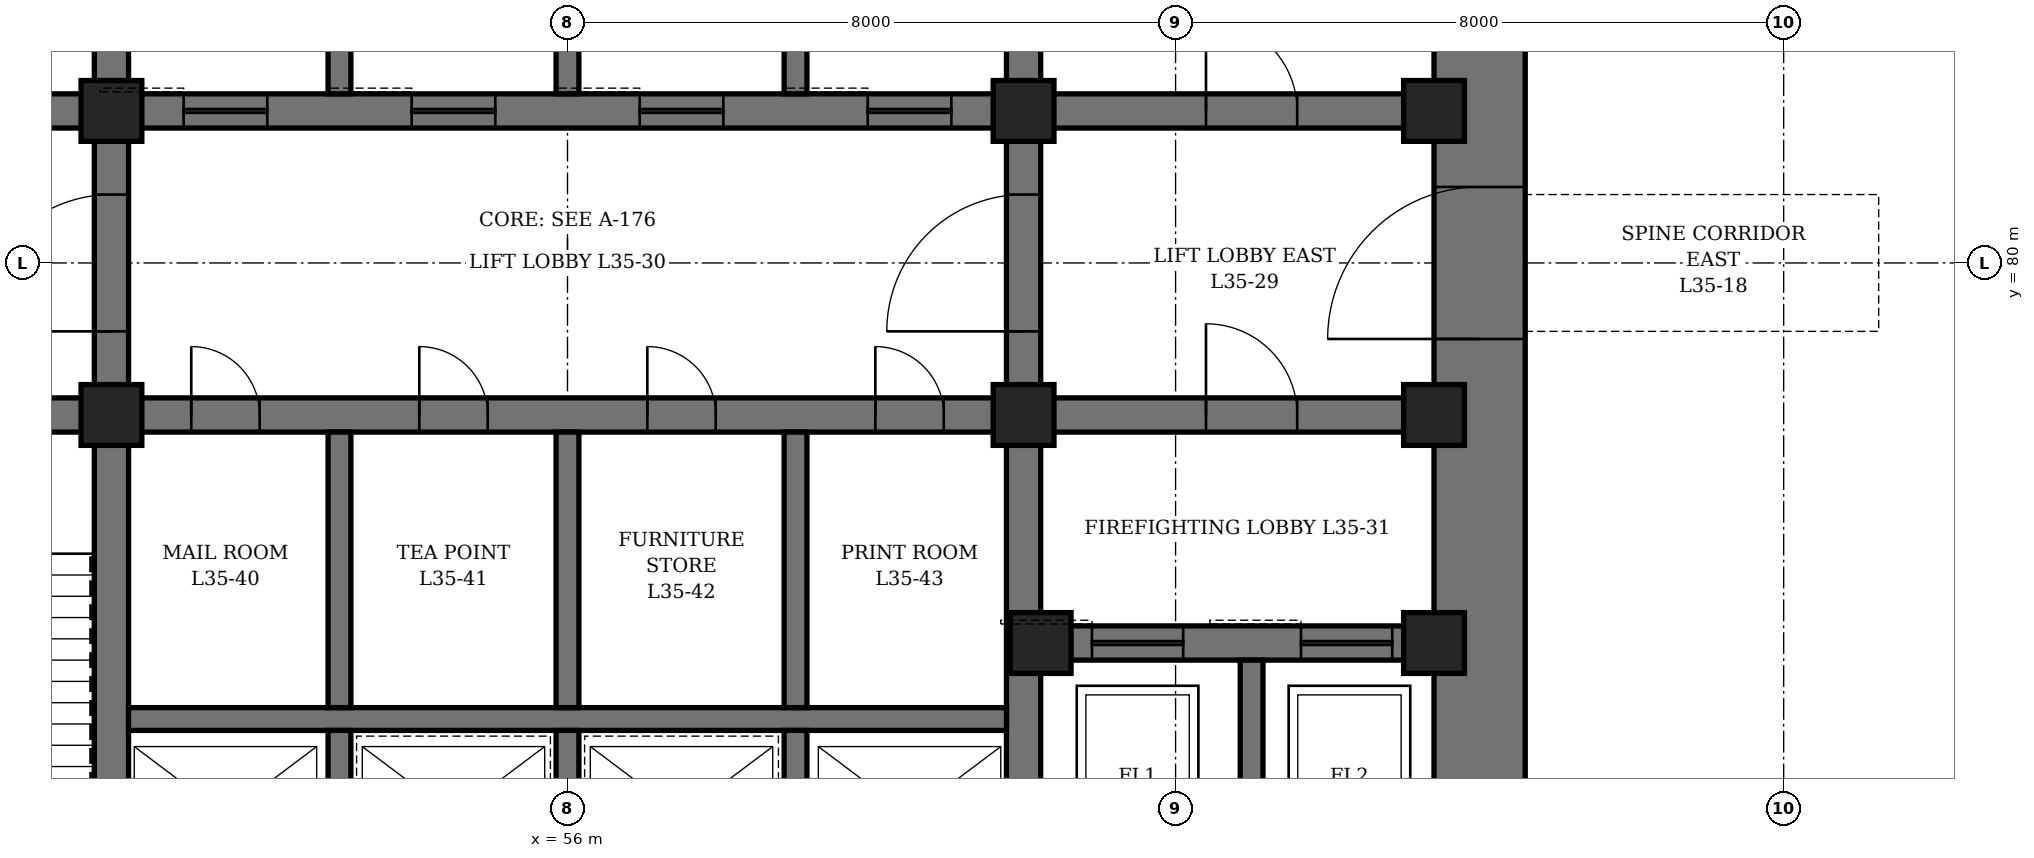
"""IFC4 building model, lengths in metres.
Left out: names, types, materials, properties, quantities, classifications, styles, units other than length and angle.
Written with IfcOpenShell. Run it as: python <this file> out.ifc"""

import sys

from ifc_helpers import new_model, si_unit, direction, frame, frame_2d, origin, origin_2d, place, context, subcontext, project, spatial, rectangle, hollow_rectangle, extrude, element, fill, save


model = new_model("IFC4")
c1 = context("Model", 3, precision=1e-05, world=origin(), true_north=direction((0.0, 1.0)))
c2 = subcontext(c1, "Body", "Model", "MODEL_VIEW")
j1 = project(units=[si_unit("LENGTHUNIT", "METRE"), si_unit("PLANEANGLEUNIT", "RADIAN")], contexts=[c1])
p1 = place(None, origin())
s1 = spatial("IfcSite", under=j1, at=p1, CompositionType="ELEMENT")
p2 = place(p1, origin())
s2 = spatial("IfcBuilding", under=s1, at=p2, CompositionType="ELEMENT")
p3 = place(p2, frame((0.0, 0.0, 158.5)))
s3 = spatial("IfcBuildingStorey", under=s2, at=p3, CompositionType="ELEMENT", Elevation=158.5)
p4 = place(p3, frame((68.0, 70.4, 0.0), z_axis=(0.0, 0.0, 1.0), x_axis=(0.0, 1.0, 0.0)))
e1 = element("IfcWall", 1, at=p4, inside=s3, PredefinedType="SHEAR", context=c2, shape_type="SweptSolid", body=[
    extrude(rectangle(XDim=19.2, YDim=1.2, at=frame_2d((9.6, 0.0))), origin(), (0.0, 0.0, 1.0), 4.2),
])
p5 = place(p4, frame((8.6, 0.0, 0.0)))
e2 = element("IfcOpeningElement", 2, at=p5, cuts=e1, PredefinedType="OPENING", context=c2, shape_type="SweptSolid", body=[
    extrude(rectangle(XDim=2.0, YDim=2.4, at=frame_2d((1.0, 1.2))), frame((0.0, 0.61, 0.0), z_axis=(0.0, -1.0, 0.0), x_axis=(1.0, 0.0, 0.0)), (0.0, 0.0, 1.0), 1.22),
])
p6 = place(p3, frame((50.0, 71.6, 0.0), z_axis=(0.0, 0.0, 1.0), x_axis=(0.0, 1.0, 0.0)))
e3 = element("IfcWall", 3, at=p6, inside=s3, PredefinedType="SHEAR", context=c2, shape_type="SweptSolid", body=[
    extrude(rectangle(XDim=16.8, YDim=0.45, at=frame_2d((8.4, 0.0))), origin(), (0.0, 0.0, 1.0), 4.2),
])
p7 = place(p6, frame((7.5, 0.0, 0.0)))
e4 = element("IfcOpeningElement", 4, at=p7, cuts=e3, PredefinedType="OPENING", context=c2, shape_type="SweptSolid", body=[
    extrude(rectangle(XDim=1.8, YDim=2.4, at=frame_2d((0.9, 1.2))), frame((0.0, 0.235, 0.0), z_axis=(0.0, -1.0, 0.0), x_axis=(1.0, 0.0, 0.0)), (0.0, 0.0, 1.0), 0.47),
])
p8 = place(p3, frame((62.0, 71.6, 0.0), z_axis=(0.0, 0.0, 1.0), x_axis=(0.0, 1.0, 0.0)))
e5 = element("IfcWall", 5, at=p8, inside=s3, PredefinedType="SHEAR", context=c2, shape_type="SweptSolid", body=[
    extrude(rectangle(XDim=16.8, YDim=0.45, at=frame_2d((8.4, 0.0))), origin(), (0.0, 0.0, 1.0), 4.2),
])
p9 = place(p8, frame((7.5, 0.0, 0.0)))
e6 = element("IfcOpeningElement", 6, at=p9, cuts=e5, PredefinedType="OPENING", context=c2, shape_type="SweptSolid", body=[
    extrude(rectangle(XDim=1.8, YDim=2.4, at=frame_2d((0.9, 1.2))), frame((0.0, 0.235, 0.0), z_axis=(0.0, -1.0, 0.0), x_axis=(1.0, 0.0, 0.0)), (0.0, 0.0, 1.0), 0.47),
])
p10 = place(p3, frame((44.6, 78.0, 0.0), z_axis=(0.0, 0.0, 1.0), x_axis=(1.0, 0.0, 0.0)))
e7 = element("IfcWall", 7, at=p10, inside=s3, PredefinedType="SHEAR", context=c2, shape_type="SweptSolid", body=[
    extrude(rectangle(XDim=5.175, YDim=0.45, at=frame_2d((2.587, 0.0))), origin(), (0.0, 0.0, 1.0), 4.2),
])
p11 = place(p10, frame((1.8, 0.0, 0.0)))
e8 = element("IfcOpeningElement", 8, at=p11, cuts=e7, PredefinedType="OPENING", context=c2, shape_type="SweptSolid", body=[
    extrude(rectangle(XDim=1.2, YDim=2.1, at=frame_2d((0.6, 1.05))), frame((0.0, 0.235, 0.0), z_axis=(0.0, -1.0, 0.0), x_axis=(1.0, 0.0, 0.0)), (0.0, 0.0, 1.0), 0.47),
])
p12 = place(p3, frame((44.6, 82.0, 0.0), z_axis=(0.0, 0.0, 1.0), x_axis=(1.0, 0.0, 0.0)))
e9 = element("IfcWall", 9, at=p12, inside=s3, PredefinedType="SHEAR", context=c2, shape_type="SweptSolid", body=[
    extrude(rectangle(XDim=5.175, YDim=0.45, at=frame_2d((2.587, 0.0))), origin(), (0.0, 0.0, 1.0), 4.2),
])
p13 = place(p12, frame((0.7, 0.0, 0.0)))
e10 = element("IfcOpeningElement", 10, at=p13, cuts=e9, PredefinedType="OPENING", context=c2, shape_type="SweptSolid", body=[
    extrude(rectangle(XDim=0.9, YDim=2.1, at=frame_2d((0.45, 1.05))), frame((0.0, 0.235, 0.0), z_axis=(0.0, -1.0, 0.0), x_axis=(1.0, 0.0, 0.0)), (0.0, 0.0, 1.0), 0.47),
])
p14 = place(p3, frame((62.225, 75.0, 0.0), z_axis=(0.0, 0.0, 1.0), x_axis=(1.0, 0.0, 0.0)))
e11 = element("IfcWall", 11, at=p14, inside=s3, PredefinedType="SHEAR", context=c2, shape_type="SweptSolid", body=[
    extrude(rectangle(XDim=5.175, YDim=0.45, at=frame_2d((2.587, 0.0))), origin(), (0.0, 0.0, 1.0), 4.2),
])
p15 = place(p14, frame((0.675, 0.0, 0.0)))
e12 = element("IfcOpeningElement", 12, at=p15, cuts=e11, PredefinedType="OPENING", context=c2, shape_type="SweptSolid", body=[
    extrude(rectangle(XDim=1.2, YDim=2.2, at=frame_2d((0.6, 1.1))), frame((0.0, 0.235, 0.0), z_axis=(0.0, -1.0, 0.0), x_axis=(1.0, 0.0, 0.0)), (0.0, 0.0, 1.0), 0.47),
])
p16 = place(p14, frame((3.425, 0.0, 0.0)))
e13 = element("IfcOpeningElement", 13, at=p16, cuts=e11, PredefinedType="OPENING", context=c2, shape_type="SweptSolid", body=[
    extrude(rectangle(XDim=1.2, YDim=2.2, at=frame_2d((0.6, 1.1))), frame((0.0, 0.235, 0.0), z_axis=(0.0, -1.0, 0.0), x_axis=(1.0, 0.0, 0.0)), (0.0, 0.0, 1.0), 0.47),
])
p17 = place(p3, frame((62.225, 78.0, 0.0), z_axis=(0.0, 0.0, 1.0), x_axis=(1.0, 0.0, 0.0)))
e14 = element("IfcWall", 14, at=p17, inside=s3, PredefinedType="SHEAR", context=c2, shape_type="SweptSolid", body=[
    extrude(rectangle(XDim=5.175, YDim=0.45, at=frame_2d((2.587, 0.0))), origin(), (0.0, 0.0, 1.0), 4.2),
])
p18 = place(p17, frame((2.175, 0.0, 0.0)))
e15 = element("IfcOpeningElement", 15, at=p18, cuts=e14, PredefinedType="OPENING", context=c2, shape_type="SweptSolid", body=[
    extrude(rectangle(XDim=1.2, YDim=2.1, at=frame_2d((0.6, 1.05))), frame((0.0, 0.235, 0.0), z_axis=(0.0, -1.0, 0.0), x_axis=(1.0, 0.0, 0.0)), (0.0, 0.0, 1.0), 0.47),
])
p19 = place(p3, frame((62.225, 82.0, 0.0), z_axis=(0.0, 0.0, 1.0), x_axis=(1.0, 0.0, 0.0)))
e16 = element("IfcWall", 16, at=p19, inside=s3, PredefinedType="SHEAR", context=c2, shape_type="SweptSolid", body=[
    extrude(rectangle(XDim=5.175, YDim=0.45, at=frame_2d((2.587, 0.0))), origin(), (0.0, 0.0, 1.0), 4.2),
])
p20 = place(p19, frame((2.175, 0.0, 0.0)))
e17 = element("IfcOpeningElement", 17, at=p20, cuts=e16, PredefinedType="OPENING", context=c2, shape_type="SweptSolid", body=[
    extrude(rectangle(XDim=1.2, YDim=2.1, at=frame_2d((0.6, 1.05))), frame((0.0, 0.235, 0.0), z_axis=(0.0, -1.0, 0.0), x_axis=(1.0, 0.0, 0.0)), (0.0, 0.0, 1.0), 0.47),
])
p21 = place(p3, frame((50.225, 78.0, 0.0), z_axis=(0.0, 0.0, 1.0), x_axis=(1.0, 0.0, 0.0)))
e18 = element("IfcWall", 18, at=p21, inside=s3, PredefinedType="SHEAR", context=c2, shape_type="SweptSolid", body=[
    extrude(rectangle(XDim=11.55, YDim=0.45, at=frame_2d((5.775, 0.0))), origin(), (0.0, 0.0, 1.0), 4.2),
])
p22 = place(p21, frame((0.825, 0.0, 0.0)))
e19 = element("IfcOpeningElement", 19, at=p22, cuts=e18, PredefinedType="OPENING", context=c2, shape_type="SweptSolid", body=[
    extrude(rectangle(XDim=0.9, YDim=2.1, at=frame_2d((0.45, 1.05))), frame((0.0, 0.235, 0.0), z_axis=(0.0, -1.0, 0.0), x_axis=(1.0, 0.0, 0.0)), (0.0, 0.0, 1.0), 0.47),
])
p23 = place(p21, frame((3.825, 0.0, 0.0)))
e20 = element("IfcOpeningElement", 20, at=p23, cuts=e18, PredefinedType="OPENING", context=c2, shape_type="SweptSolid", body=[
    extrude(rectangle(XDim=0.9, YDim=2.1, at=frame_2d((0.45, 1.05))), frame((0.0, 0.235, 0.0), z_axis=(0.0, -1.0, 0.0), x_axis=(1.0, 0.0, 0.0)), (0.0, 0.0, 1.0), 0.47),
])
p24 = place(p21, frame((6.825, 0.0, 0.0)))
e21 = element("IfcOpeningElement", 21, at=p24, cuts=e18, PredefinedType="OPENING", context=c2, shape_type="SweptSolid", body=[
    extrude(rectangle(XDim=0.9, YDim=2.1, at=frame_2d((0.45, 1.05))), frame((0.0, 0.235, 0.0), z_axis=(0.0, -1.0, 0.0), x_axis=(1.0, 0.0, 0.0)), (0.0, 0.0, 1.0), 0.47),
])
p25 = place(p21, frame((9.825, 0.0, 0.0)))
e22 = element("IfcOpeningElement", 22, at=p25, cuts=e18, PredefinedType="OPENING", context=c2, shape_type="SweptSolid", body=[
    extrude(rectangle(XDim=0.9, YDim=2.1, at=frame_2d((0.45, 1.05))), frame((0.0, 0.235, 0.0), z_axis=(0.0, -1.0, 0.0), x_axis=(1.0, 0.0, 0.0)), (0.0, 0.0, 1.0), 0.47),
])
p26 = place(p3, frame((50.225, 82.0, 0.0), z_axis=(0.0, 0.0, 1.0), x_axis=(1.0, 0.0, 0.0)))
e23 = element("IfcWall", 23, at=p26, inside=s3, PredefinedType="SHEAR", context=c2, shape_type="SweptSolid", body=[
    extrude(rectangle(XDim=11.55, YDim=0.45, at=frame_2d((5.775, 0.0))), origin(), (0.0, 0.0, 1.0), 4.2),
])
p27 = place(p26, frame((0.725, 0.0, 0.0)))
e24 = element("IfcOpeningElement", 24, at=p27, cuts=e23, PredefinedType="OPENING", context=c2, shape_type="SweptSolid", body=[
    extrude(rectangle(XDim=1.1, YDim=2.2, at=frame_2d((0.55, 1.1))), frame((0.0, 0.235, 0.0), z_axis=(0.0, -1.0, 0.0), x_axis=(1.0, 0.0, 0.0)), (0.0, 0.0, 1.0), 0.47),
])
p28 = place(p26, frame((3.725, 0.0, 0.0)))
e25 = element("IfcOpeningElement", 25, at=p28, cuts=e23, PredefinedType="OPENING", context=c2, shape_type="SweptSolid", body=[
    extrude(rectangle(XDim=1.1, YDim=2.2, at=frame_2d((0.55, 1.1))), frame((0.0, 0.235, 0.0), z_axis=(0.0, -1.0, 0.0), x_axis=(1.0, 0.0, 0.0)), (0.0, 0.0, 1.0), 0.47),
])
p29 = place(p26, frame((6.725, 0.0, 0.0)))
e26 = element("IfcOpeningElement", 26, at=p29, cuts=e23, PredefinedType="OPENING", context=c2, shape_type="SweptSolid", body=[
    extrude(rectangle(XDim=1.1, YDim=2.2, at=frame_2d((0.55, 1.1))), frame((0.0, 0.235, 0.0), z_axis=(0.0, -1.0, 0.0), x_axis=(1.0, 0.0, 0.0)), (0.0, 0.0, 1.0), 0.47),
])
p30 = place(p26, frame((9.725, 0.0, 0.0)))
e27 = element("IfcOpeningElement", 27, at=p30, cuts=e23, PredefinedType="OPENING", context=c2, shape_type="SweptSolid", body=[
    extrude(rectangle(XDim=1.1, YDim=2.2, at=frame_2d((0.55, 1.1))), frame((0.0, 0.235, 0.0), z_axis=(0.0, -1.0, 0.0), x_axis=(1.0, 0.0, 0.0)), (0.0, 0.0, 1.0), 0.47),
])
p31 = place(p3, frame((50.225, 74.0, 0.0), z_axis=(0.0, 0.0, 1.0), x_axis=(1.0, 0.0, 0.0)))
e28 = element("IfcWall", 28, at=p31, inside=s3, PredefinedType="SHEAR", context=c2, shape_type="SweptSolid", body=[
    extrude(rectangle(XDim=11.55, YDim=0.3, at=frame_2d((5.775, 0.0))), origin(), (0.0, 0.0, 1.0), 4.2),
])
p32 = place(p3, frame((53.0, 71.6, 0.0), z_axis=(0.0, 0.0, 1.0), x_axis=(0.0, 1.0, 0.0)))
e29 = element("IfcWall", 29, at=p32, inside=s3, PredefinedType="SHEAR", context=c2, shape_type="SweptSolid", body=[
    extrude(rectangle(XDim=2.25, YDim=0.3, at=frame_2d((1.125, 0.0))), origin(), (0.0, 0.0, 1.0), 4.2),
])
p33 = place(p3, frame((53.0, 74.15, 0.0), z_axis=(0.0, 0.0, 1.0), x_axis=(0.0, 1.0, 0.0)))
e30 = element("IfcWall", 30, at=p33, inside=s3, PredefinedType="SHEAR", context=c2, shape_type="SweptSolid", body=[
    extrude(rectangle(XDim=3.625, YDim=0.3, at=frame_2d((1.812, 0.0))), origin(), (0.0, 0.0, 1.0), 4.2),
])
p34 = place(p3, frame((53.0, 82.225, 0.0), z_axis=(0.0, 0.0, 1.0), x_axis=(0.0, 1.0, 0.0)))
e31 = element("IfcWall", 31, at=p34, inside=s3, PredefinedType="SHEAR", context=c2, shape_type="SweptSolid", body=[
    extrude(rectangle(XDim=3.55, YDim=0.3, at=frame_2d((1.775, 0.0))), origin(), (0.0, 0.0, 1.0), 4.2),
])
p35 = place(p3, frame((56.0, 71.6, 0.0), z_axis=(0.0, 0.0, 1.0), x_axis=(0.0, 1.0, 0.0)))
e32 = element("IfcWall", 32, at=p35, inside=s3, PredefinedType="SHEAR", context=c2, shape_type="SweptSolid", body=[
    extrude(rectangle(XDim=2.25, YDim=0.3, at=frame_2d((1.125, 0.0))), origin(), (0.0, 0.0, 1.0), 4.2),
])
p36 = place(p3, frame((56.0, 74.15, 0.0), z_axis=(0.0, 0.0, 1.0), x_axis=(0.0, 1.0, 0.0)))
e33 = element("IfcWall", 33, at=p36, inside=s3, PredefinedType="SHEAR", context=c2, shape_type="SweptSolid", body=[
    extrude(rectangle(XDim=3.625, YDim=0.3, at=frame_2d((1.812, 0.0))), origin(), (0.0, 0.0, 1.0), 4.2),
])
p37 = place(p3, frame((56.0, 82.225, 0.0), z_axis=(0.0, 0.0, 1.0), x_axis=(0.0, 1.0, 0.0)))
e34 = element("IfcWall", 34, at=p37, inside=s3, PredefinedType="SHEAR", context=c2, shape_type="SweptSolid", body=[
    extrude(rectangle(XDim=3.55, YDim=0.3, at=frame_2d((1.775, 0.0))), origin(), (0.0, 0.0, 1.0), 4.2),
])
p38 = place(p3, frame((59.0, 71.6, 0.0), z_axis=(0.0, 0.0, 1.0), x_axis=(0.0, 1.0, 0.0)))
e35 = element("IfcWall", 35, at=p38, inside=s3, PredefinedType="SHEAR", context=c2, shape_type="SweptSolid", body=[
    extrude(rectangle(XDim=2.25, YDim=0.3, at=frame_2d((1.125, 0.0))), origin(), (0.0, 0.0, 1.0), 4.2),
])
p39 = place(p3, frame((59.0, 74.15, 0.0), z_axis=(0.0, 0.0, 1.0), x_axis=(0.0, 1.0, 0.0)))
e36 = element("IfcWall", 36, at=p39, inside=s3, PredefinedType="SHEAR", context=c2, shape_type="SweptSolid", body=[
    extrude(rectangle(XDim=3.625, YDim=0.3, at=frame_2d((1.812, 0.0))), origin(), (0.0, 0.0, 1.0), 4.2),
])
p40 = place(p3, frame((59.0, 82.225, 0.0), z_axis=(0.0, 0.0, 1.0), x_axis=(0.0, 1.0, 0.0)))
e37 = element("IfcWall", 37, at=p40, inside=s3, PredefinedType="SHEAR", context=c2, shape_type="SweptSolid", body=[
    extrude(rectangle(XDim=3.55, YDim=0.3, at=frame_2d((1.775, 0.0))), origin(), (0.0, 0.0, 1.0), 4.2),
])
p41 = place(p3, frame((65.0, 71.6, 0.0), z_axis=(0.0, 0.0, 1.0), x_axis=(0.0, 1.0, 0.0)))
e38 = element("IfcWall", 38, at=p41, inside=s3, PredefinedType="SHEAR", context=c2, shape_type="SweptSolid", body=[
    extrude(rectangle(XDim=3.175, YDim=0.3, at=frame_2d((1.587, 0.0))), origin(), (0.0, 0.0, 1.0), 4.2),
])
for number, where, z_axis, x_axis in (
    (39, (50.0, 78.0, 0.0), (0.0, 0.0, 1.0), (1.0, 0.0, 0.0)),
    (40, (50.0, 82.0, 0.0), (0.0, 0.0, 1.0), (1.0, 0.0, 0.0)),
    (41, (62.0, 78.0, 0.0), (0.0, 0.0, 1.0), (1.0, 0.0, 0.0)),
    (42, (62.0, 82.0, 0.0), (0.0, 0.0, 1.0), (1.0, 0.0, 0.0)),
    (43, (62.225, 75.0, 0.0), (0.0, 0.0, 1.0), (1.0, 0.0, 0.0)),
    (44, (67.4, 75.0, 0.0), (0.0, 0.0, 1.0), (1.0, 0.0, 0.0)),
    (45, (67.4, 78.0, 0.0), (0.0, 0.0, 1.0), (1.0, 0.0, 0.0)),
    (46, (67.4, 82.0, 0.0), (0.0, 0.0, 1.0), (1.0, 0.0, 0.0)),
):
    element("IfcColumn", number, at=place(p3, frame(where, z_axis=z_axis, x_axis=x_axis)), inside=s3, PredefinedType="COLUMN", context=c2, shape_type="SweptSolid", body=[
        extrude(hollow_rectangle(XDim=0.8, YDim=0.8, WallThickness=0.1, at=origin_2d()), origin(), (0.0, 0.0, 1.0), 4.2),
    ])
p42 = place(p22, origin())
e47 = element("IfcDoor", 47, at=p42, inside=s3, OperationType="SINGLE_SWING_LEFT", PredefinedType="DOOR", context=c2, shape_type="SweptSolid", body=[
    extrude(rectangle(XDim=0.9, YDim=2.1, at=frame_2d((0.45, 1.05))), frame((0.0, 0.225, 0.0), z_axis=(0.0, -1.0, 0.0), x_axis=(1.0, 0.0, 0.0)), (0.0, 0.0, 1.0), 0.449),
])
fill(e19, e47)
p43 = place(p23, origin())
e48 = element("IfcDoor", 48, at=p43, inside=s3, OperationType="SINGLE_SWING_LEFT", PredefinedType="DOOR", context=c2, shape_type="SweptSolid", body=[
    extrude(rectangle(XDim=0.9, YDim=2.1, at=frame_2d((0.45, 1.05))), frame((0.0, 0.225, 0.0), z_axis=(0.0, -1.0, 0.0), x_axis=(1.0, 0.0, 0.0)), (0.0, 0.0, 1.0), 0.449),
])
fill(e20, e48)
p44 = place(p24, origin())
e49 = element("IfcDoor", 49, at=p44, inside=s3, OperationType="SINGLE_SWING_LEFT", PredefinedType="DOOR", context=c2, shape_type="SweptSolid", body=[
    extrude(rectangle(XDim=0.9, YDim=2.1, at=frame_2d((0.45, 1.05))), frame((0.0, 0.225, 0.0), z_axis=(0.0, -1.0, 0.0), x_axis=(1.0, 0.0, 0.0)), (0.0, 0.0, 1.0), 0.449),
])
fill(e21, e49)
p45 = place(p25, origin())
e50 = element("IfcDoor", 50, at=p45, inside=s3, OperationType="SINGLE_SWING_LEFT", PredefinedType="DOOR", context=c2, shape_type="SweptSolid", body=[
    extrude(rectangle(XDim=0.9, YDim=2.1, at=frame_2d((0.45, 1.05))), frame((0.0, 0.225, 0.0), z_axis=(0.0, -1.0, 0.0), x_axis=(1.0, 0.0, 0.0)), (0.0, 0.0, 1.0), 0.449),
])
fill(e22, e50)
p46 = place(p20, origin())
e51 = element("IfcDoor", 51, at=p46, inside=s3, OperationType="SINGLE_SWING_LEFT", PredefinedType="DOOR", context=c2, shape_type="SweptSolid", body=[
    extrude(rectangle(XDim=1.2, YDim=2.1, at=frame_2d((0.6, 1.05))), frame((0.0, 0.225, 0.0), z_axis=(0.0, -1.0, 0.0), x_axis=(1.0, 0.0, 0.0)), (0.0, 0.0, 1.0), 0.449),
])
fill(e17, e51)
p47 = place(p5, origin())
e52 = element("IfcDoor", 52, at=p47, inside=s3, OperationType="DOUBLE_DOOR_SINGLE_SWING", PredefinedType="DOOR", context=c2, shape_type="SweptSolid", body=[
    extrude(rectangle(XDim=2.0, YDim=2.4, at=frame_2d((1.0, 1.2))), frame((0.0, 0.35, 0.0), z_axis=(0.0, -1.0, 0.0), x_axis=(1.0, 0.0, 0.0)), (0.0, 0.0, 1.0), 0.7),
])
fill(e2, e52)
p48 = place(p7, origin())
e53 = element("IfcDoor", 53, at=p48, inside=s3, OperationType="DOUBLE_DOOR_SINGLE_SWING", PredefinedType="DOOR", context=c2, shape_type="SweptSolid", body=[
    extrude(rectangle(XDim=1.8, YDim=2.4, at=frame_2d((0.9, 1.2))), frame((0.0, 0.225, 0.0), z_axis=(0.0, -1.0, 0.0), x_axis=(1.0, 0.0, 0.0)), (0.0, 0.0, 1.0), 0.449),
])
fill(e4, e53)
p49 = place(p9, origin())
e54 = element("IfcDoor", 54, at=p49, inside=s3, OperationType="DOUBLE_DOOR_SINGLE_SWING", PredefinedType="DOOR", context=c2, shape_type="SweptSolid", body=[
    extrude(rectangle(XDim=1.8, YDim=2.4, at=frame_2d((0.9, 1.2))), frame((0.0, 0.225, 0.0), z_axis=(0.0, -1.0, 0.0), x_axis=(1.0, 0.0, 0.0)), (0.0, 0.0, 1.0), 0.449),
])
fill(e6, e54)
p50 = place(p18, origin())
e55 = element("IfcDoor", 55, at=p50, inside=s3, OperationType="SINGLE_SWING_RIGHT", PredefinedType="DOOR", context=c2, shape_type="SweptSolid", body=[
    extrude(rectangle(XDim=1.2, YDim=2.1, at=frame_2d((0.6, 1.05))), frame((0.0, 0.225, 0.0), z_axis=(0.0, -1.0, 0.0), x_axis=(1.0, 0.0, 0.0)), (0.0, 0.0, 1.0), 0.449),
])
fill(e15, e55)
p51 = place(p27, origin())
e56 = element("IfcDoor", 56, at=p51, inside=s3, OperationType="SLIDING_TO_LEFT", PredefinedType="DOOR", context=c2, shape_type="SweptSolid", body=[
    extrude(rectangle(XDim=1.1, YDim=2.2, at=frame_2d((0.55, 1.1))), frame((0.0, 0.225, 0.0), z_axis=(0.0, -1.0, 0.0), x_axis=(1.0, 0.0, 0.0)), (0.0, 0.0, 1.0), 0.449),
])
fill(e24, e56)
p52 = place(p28, origin())
e57 = element("IfcDoor", 57, at=p52, inside=s3, OperationType="SLIDING_TO_LEFT", PredefinedType="DOOR", context=c2, shape_type="SweptSolid", body=[
    extrude(rectangle(XDim=1.1, YDim=2.2, at=frame_2d((0.55, 1.1))), frame((0.0, 0.225, 0.0), z_axis=(0.0, -1.0, 0.0), x_axis=(1.0, 0.0, 0.0)), (0.0, 0.0, 1.0), 0.449),
])
fill(e25, e57)
p53 = place(p29, origin())
e58 = element("IfcDoor", 58, at=p53, inside=s3, OperationType="SLIDING_TO_LEFT", PredefinedType="DOOR", context=c2, shape_type="SweptSolid", body=[
    extrude(rectangle(XDim=1.1, YDim=2.2, at=frame_2d((0.55, 1.1))), frame((0.0, 0.225, 0.0), z_axis=(0.0, -1.0, 0.0), x_axis=(1.0, 0.0, 0.0)), (0.0, 0.0, 1.0), 0.449),
])
fill(e26, e58)
p54 = place(p30, origin())
e59 = element("IfcDoor", 59, at=p54, inside=s3, OperationType="SLIDING_TO_LEFT", PredefinedType="DOOR", context=c2, shape_type="SweptSolid", body=[
    extrude(rectangle(XDim=1.1, YDim=2.2, at=frame_2d((0.55, 1.1))), frame((0.0, 0.225, 0.0), z_axis=(0.0, -1.0, 0.0), x_axis=(1.0, 0.0, 0.0)), (0.0, 0.0, 1.0), 0.449),
])
fill(e27, e59)
p55 = place(p15, origin())
e60 = element("IfcDoor", 60, at=p55, inside=s3, OperationType="SLIDING_TO_LEFT", PredefinedType="DOOR", context=c2, shape_type="SweptSolid", body=[
    extrude(rectangle(XDim=1.2, YDim=2.2, at=frame_2d((0.6, 1.1))), frame((0.0, 0.225, 0.0), z_axis=(0.0, -1.0, 0.0), x_axis=(1.0, 0.0, 0.0)), (0.0, 0.0, 1.0), 0.449),
])
fill(e12, e60)
p56 = place(p16, origin())
e61 = element("IfcDoor", 61, at=p56, inside=s3, OperationType="SLIDING_TO_LEFT", PredefinedType="DOOR", context=c2, shape_type="SweptSolid", body=[
    extrude(rectangle(XDim=1.2, YDim=2.2, at=frame_2d((0.6, 1.1))), frame((0.0, 0.225, 0.0), z_axis=(0.0, -1.0, 0.0), x_axis=(1.0, 0.0, 0.0)), (0.0, 0.0, 1.0), 0.449),
])
fill(e13, e61)
save(model, sys.argv[1])
